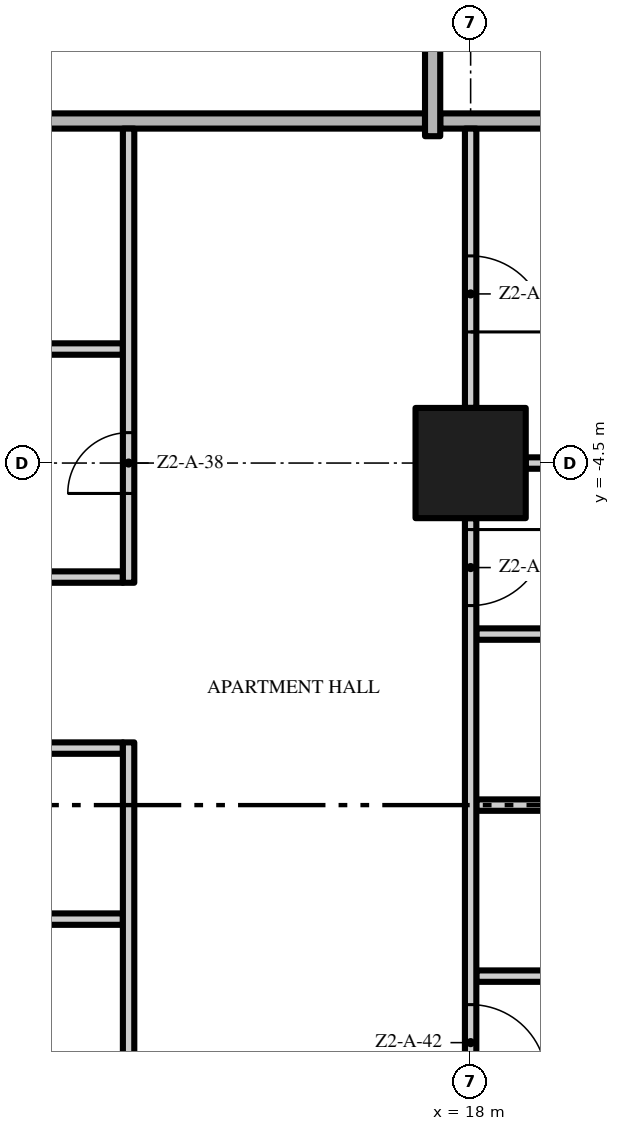
"""IFC4 building model, lengths in metres.
Left out: names, types, materials, properties, quantities, classifications, styles, units other than length and angle.
Written with IfcOpenShell. Run it as: python <this file> out.ifc"""

import sys

from ifc_helpers import new_model, si_unit, direction, frame, frame_2d, origin, origin_2d, place, context, subcontext, project, spatial, rectangle, extrude, element, fill, save


model = new_model("IFC4")
c1 = context("Model", 3, precision=1e-05, world=origin(), true_north=direction((0.0, 1.0)))
c2 = subcontext(c1, "Body", "Model", "MODEL_VIEW")
j1 = project(units=[si_unit("LENGTHUNIT", "METRE"), si_unit("PLANEANGLEUNIT", "RADIAN")], contexts=[c1])
p1 = place(None, origin())
s1 = spatial("IfcSite", under=j1, at=p1, CompositionType="ELEMENT")
p2 = place(p1, origin())
s2 = spatial("IfcBuilding", under=s1, at=p2, CompositionType="ELEMENT")
p3 = place(p2, frame((0.0, 0.0, 73.2)))
s3 = spatial("IfcBuildingStorey", under=s2, at=p3, CompositionType="ELEMENT", Elevation=73.2)
p4 = place(p3, frame((18.0, -4.5, 0.0), z_axis=(0.0, 0.0, 1.0), x_axis=(1.0, 0.0, 0.0)))
e1 = element("IfcColumn", 1, at=p4, inside=s3, PredefinedType="COLUMN", context=c2, shape_type="SweptSolid", body=[
    extrude(rectangle(XDim=1.45, YDim=1.45, at=origin_2d()), origin(), (0.0, 0.0, 1.0), 3.5),
])
p5 = place(p3, frame((18.075, -11.25, 0.0), z_axis=(0.0, 0.0, 1.0), x_axis=(1.0, 0.0, 0.0)))
e2 = element("IfcWall", 2, at=p5, inside=s3, PredefinedType="PARTITIONING", context=c2, shape_type="SweptSolid", body=[
    extrude(rectangle(XDim=2.85, YDim=0.15, at=frame_2d((1.425, 0.0))), origin(), (0.0, 0.0, 1.0), 3.5),
])
p6 = place(p3, frame((9.075, -10.5, 0.0), z_axis=(0.0, 0.0, 1.0), x_axis=(1.0, 0.0, 0.0)))
e3 = element("IfcWall", 3, at=p6, inside=s3, PredefinedType="PARTITIONING", context=c2, shape_type="SweptSolid", body=[
    extrude(rectangle(XDim=4.35, YDim=0.15, at=frame_2d((2.175, 0.0))), origin(), (0.0, 0.0, 1.0), 3.5),
])
p7 = place(p3, frame((18.075, -9.0, 0.0), z_axis=(0.0, 0.0, 1.0), x_axis=(1.0, 0.0, 0.0)))
e4 = element("IfcWall", 4, at=p7, inside=s3, PredefinedType="PARTITIONING", context=c2, shape_type="SweptSolid", body=[
    extrude(rectangle(XDim=2.85, YDim=0.15, at=frame_2d((1.425, 0.0))), origin(), (0.0, 0.0, 1.0), 3.5),
])
p8 = place(p3, frame((13.425, -8.25, 0.0), z_axis=(0.0, 0.0, 1.0), x_axis=(-1.0, 0.0, 0.0)))
e5 = element("IfcWall", 5, at=p8, inside=s3, PredefinedType="PARTITIONING", context=c2, shape_type="SweptSolid", body=[
    extrude(rectangle(XDim=4.35, YDim=0.15, at=frame_2d((2.175, 0.0))), origin(), (0.0, 0.0, 1.0), 3.5),
])
p9 = place(p8, frame((1.7, 0.0, 0.0)))
e6 = element("IfcOpeningElement", 6, at=p9, cuts=e5, PredefinedType="OPENING", context=c2, shape_type="SweptSolid", body=[
    extrude(rectangle(XDim=0.9, YDim=2.1, at=frame_2d((0.45, 1.05))), frame((0.0, 0.085, 0.0), z_axis=(0.0, -1.0, 0.0), x_axis=(1.0, 0.0, 0.0)), (0.0, 0.0, 1.0), 0.17),
])
p10 = place(p3, frame((18.075, -6.75, 0.0), z_axis=(0.0, 0.0, 1.0), x_axis=(1.0, 0.0, 0.0)))
e7 = element("IfcWall", 7, at=p10, inside=s3, PredefinedType="PARTITIONING", context=c2, shape_type="SweptSolid", body=[
    extrude(rectangle(XDim=2.85, YDim=0.15, at=frame_2d((1.425, 0.0))), origin(), (0.0, 0.0, 1.0), 3.5),
])
p11 = place(p3, frame((9.075, -6.0, 0.0), z_axis=(0.0, 0.0, 1.0), x_axis=(1.0, 0.0, 0.0)))
e8 = element("IfcWall", 8, at=p11, inside=s3, PredefinedType="PARTITIONING", context=c2, shape_type="SweptSolid", body=[
    extrude(rectangle(XDim=4.35, YDim=0.15, at=frame_2d((2.175, 0.0))), origin(), (0.0, 0.0, 1.0), 3.5),
])
p12 = place(p3, frame((18.725, -4.5, 0.0), z_axis=(0.0, 0.0, 1.0), x_axis=(1.0, 0.0, 0.0)))
e9 = element("IfcWall", 9, at=p12, inside=s3, PredefinedType="PARTITIONING", context=c2, shape_type="SweptSolid", body=[
    extrude(rectangle(XDim=6.925, YDim=0.15, at=frame_2d((3.462, 0.0))), origin(), (0.0, 0.0, 1.0), 3.5),
])
p13 = place(p3, frame((9.075, -3.0, 0.0), z_axis=(0.0, 0.0, 1.0), x_axis=(1.0, 0.0, 0.0)))
e10 = element("IfcWall", 10, at=p13, inside=s3, PredefinedType="PARTITIONING", context=c2, shape_type="SweptSolid", body=[
    extrude(rectangle(XDim=4.35, YDim=0.15, at=frame_2d((2.175, 0.0))), origin(), (0.0, 0.0, 1.0), 3.5),
])
p14 = place(p3, frame((4.6, 0.0, 0.0), z_axis=(0.0, 0.0, 1.0), x_axis=(1.0, 0.0, 0.0)))
e11 = element("IfcWall", 11, at=p14, inside=s3, PredefinedType="PARTITIONING", context=c2, shape_type="SweptSolid", body=[
    extrude(rectangle(XDim=12.8, YDim=0.2, at=frame_2d((6.4, 0.0))), origin(), (0.0, 0.0, 1.0), 3.5),
])
p15 = place(p3, frame((17.6, 0.0, 0.0), z_axis=(0.0, 0.0, 1.0), x_axis=(1.0, 0.0, 0.0)))
e12 = element("IfcWall", 12, at=p15, inside=s3, PredefinedType="PARTITIONING", context=c2, shape_type="SweptSolid", body=[
    extrude(rectangle(XDim=9.1, YDim=0.2, at=frame_2d((4.55, 0.0))), origin(), (0.0, 0.0, 1.0), 3.5),
])
p16 = place(p3, frame((13.5, -22.2, 0.0), z_axis=(0.0, 0.0, 1.0), x_axis=(0.0, 1.0, 0.0)))
e13 = element("IfcWall", 13, at=p16, inside=s3, PredefinedType="PARTITIONING", context=c2, shape_type="SweptSolid", body=[
    extrude(rectangle(XDim=14.025, YDim=0.15, at=frame_2d((7.013, 0.0))), origin(), (0.0, 0.0, 1.0), 3.5),
])
p17 = place(p16, frame((0.2, 0.0, 0.0)))
e14 = element("IfcOpeningElement", 14, at=p17, cuts=e13, PredefinedType="OPENING", context=c2, shape_type="SweptSolid", body=[
    extrude(rectangle(XDim=0.8, YDim=2.0, at=frame_2d((0.4, 1.0))), frame((0.0, 0.085, 0.0), z_axis=(0.0, -1.0, 0.0), x_axis=(1.0, 0.0, 0.0)), (0.0, 0.0, 1.0), 0.17),
])
p18 = place(p16, frame((7.8, 0.0, 0.0)))
e15 = element("IfcOpeningElement", 15, at=p18, cuts=e13, PredefinedType="OPENING", context=c2, shape_type="SweptSolid", body=[
    extrude(rectangle(XDim=1.0, YDim=2.4, at=frame_2d((0.5, 1.2))), frame((0.0, 0.085, 0.0), z_axis=(0.0, -1.0, 0.0), x_axis=(1.0, 0.0, 0.0)), (0.0, 0.0, 1.0), 0.17),
])
p19 = place(p3, frame((13.5, -6.075, 0.0), z_axis=(0.0, 0.0, 1.0), x_axis=(0.0, 1.0, 0.0)))
e16 = element("IfcWall", 16, at=p19, inside=s3, PredefinedType="PARTITIONING", context=c2, shape_type="SweptSolid", body=[
    extrude(rectangle(XDim=5.975, YDim=0.15, at=frame_2d((2.987, 0.0))), origin(), (0.0, 0.0, 1.0), 3.5),
])
p20 = place(p19, frame((1.175, 0.0, 0.0)))
e17 = element("IfcOpeningElement", 17, at=p20, cuts=e16, PredefinedType="OPENING", context=c2, shape_type="SweptSolid", body=[
    extrude(rectangle(XDim=0.8, YDim=2.0, at=frame_2d((0.4, 1.0))), frame((0.0, 0.085, 0.0), z_axis=(0.0, -1.0, 0.0), x_axis=(1.0, 0.0, 0.0)), (0.0, 0.0, 1.0), 0.17),
])
p21 = place(p3, frame((17.5, -0.2, 0.0), z_axis=(0.0, 0.0, 1.0), x_axis=(0.0, 1.0, 0.0)))
e18 = element("IfcWall", 18, at=p21, inside=s3, PredefinedType="PARTITIONING", context=c2, shape_type="SweptSolid", body=[
    extrude(rectangle(XDim=3.975, YDim=0.2, at=frame_2d((1.988, 0.0))), origin(), (0.0, 0.0, 1.0), 3.5),
])
p22 = place(p3, frame((18.0, -5.225, 0.0), z_axis=(0.0, 0.0, 1.0), x_axis=(0.0, -1.0, 0.0)))
e19 = element("IfcWall", 19, at=p22, inside=s3, PredefinedType="PARTITIONING", context=c2, shape_type="SweptSolid", body=[
    extrude(rectangle(XDim=7.55, YDim=0.15, at=frame_2d((3.775, 0.0))), origin(), (0.0, 0.0, 1.0), 3.5),
])
p23 = place(p22, frame((6.4, 0.0, 0.0)))
e20 = element("IfcOpeningElement", 20, at=p23, cuts=e19, PredefinedType="OPENING", context=c2, shape_type="SweptSolid", body=[
    extrude(rectangle(XDim=1.0, YDim=2.4, at=frame_2d((0.5, 1.2))), frame((0.0, 0.085, 0.0), z_axis=(0.0, -1.0, 0.0), x_axis=(1.0, 0.0, 0.0)), (0.0, 0.0, 1.0), 0.17),
])
p24 = place(p22, frame((0.15, 0.0, 0.0)))
e21 = element("IfcOpeningElement", 21, at=p24, cuts=e19, PredefinedType="OPENING", context=c2, shape_type="SweptSolid", body=[
    extrude(rectangle(XDim=1.0, YDim=2.4, at=frame_2d((0.5, 1.2))), frame((0.0, 0.085, 0.0), z_axis=(0.0, -1.0, 0.0), x_axis=(1.0, 0.0, 0.0)), (0.0, 0.0, 1.0), 0.17),
])
p25 = place(p3, frame((18.0, -0.1, 0.0), z_axis=(0.0, 0.0, 1.0), x_axis=(0.0, -1.0, 0.0)))
e22 = element("IfcWall", 22, at=p25, inside=s3, PredefinedType="PARTITIONING", context=c2, shape_type="SweptSolid", body=[
    extrude(rectangle(XDim=3.675, YDim=0.15, at=frame_2d((1.837, 0.0))), origin(), (0.0, 0.0, 1.0), 3.5),
])
p26 = place(p25, frame((1.675, 0.0, 0.0)))
e23 = element("IfcOpeningElement", 23, at=p26, cuts=e22, PredefinedType="OPENING", context=c2, shape_type="SweptSolid", body=[
    extrude(rectangle(XDim=1.0, YDim=2.4, at=frame_2d((0.5, 1.2))), frame((0.0, 0.085, 0.0), z_axis=(0.0, -1.0, 0.0), x_axis=(1.0, 0.0, 0.0)), (0.0, 0.0, 1.0), 0.17),
])
p27 = place(p20, origin())
e24 = element("IfcDoor", 24, at=p27, inside=s3, OperationType="SINGLE_SWING_LEFT", PredefinedType="DOOR", context=c2, shape_type="SweptSolid", body=[
    extrude(rectangle(XDim=0.8, YDim=2.0, at=frame_2d((0.4, 1.0))), frame((0.0, 0.025, 0.0), z_axis=(0.0, -1.0, 0.0), x_axis=(1.0, 0.0, 0.0)), (0.0, 0.0, 1.0), 0.05),
])
fill(e17, e24)
p28 = place(p23, origin())
e25 = element("IfcDoor", 25, at=p28, inside=s3, OperationType="SINGLE_SWING_RIGHT", PredefinedType="DOOR", context=c2, shape_type="SweptSolid", body=[
    extrude(rectangle(XDim=1.0, YDim=2.4, at=frame_2d((0.5, 1.2))), frame((0.0, 0.025, 0.0), z_axis=(0.0, -1.0, 0.0), x_axis=(1.0, 0.0, 0.0)), (0.0, 0.0, 1.0), 0.05),
])
fill(e20, e25)
p29 = place(p24, origin())
e26 = element("IfcDoor", 26, at=p29, inside=s3, OperationType="SINGLE_SWING_LEFT", PredefinedType="DOOR", context=c2, shape_type="SweptSolid", body=[
    extrude(rectangle(XDim=1.0, YDim=2.4, at=frame_2d((0.5, 1.2))), frame((0.0, 0.025, 0.0), z_axis=(0.0, -1.0, 0.0), x_axis=(1.0, 0.0, 0.0)), (0.0, 0.0, 1.0), 0.05),
])
fill(e21, e26)
p30 = place(p26, origin())
e27 = element("IfcDoor", 27, at=p30, inside=s3, OperationType="SINGLE_SWING_RIGHT", PredefinedType="DOOR", context=c2, shape_type="SweptSolid", body=[
    extrude(rectangle(XDim=1.0, YDim=2.4, at=frame_2d((0.5, 1.2))), frame((0.0, 0.025, 0.0), z_axis=(0.0, -1.0, 0.0), x_axis=(1.0, 0.0, 0.0)), (0.0, 0.0, 1.0), 0.05),
])
fill(e23, e27)
save(model, sys.argv[1])
